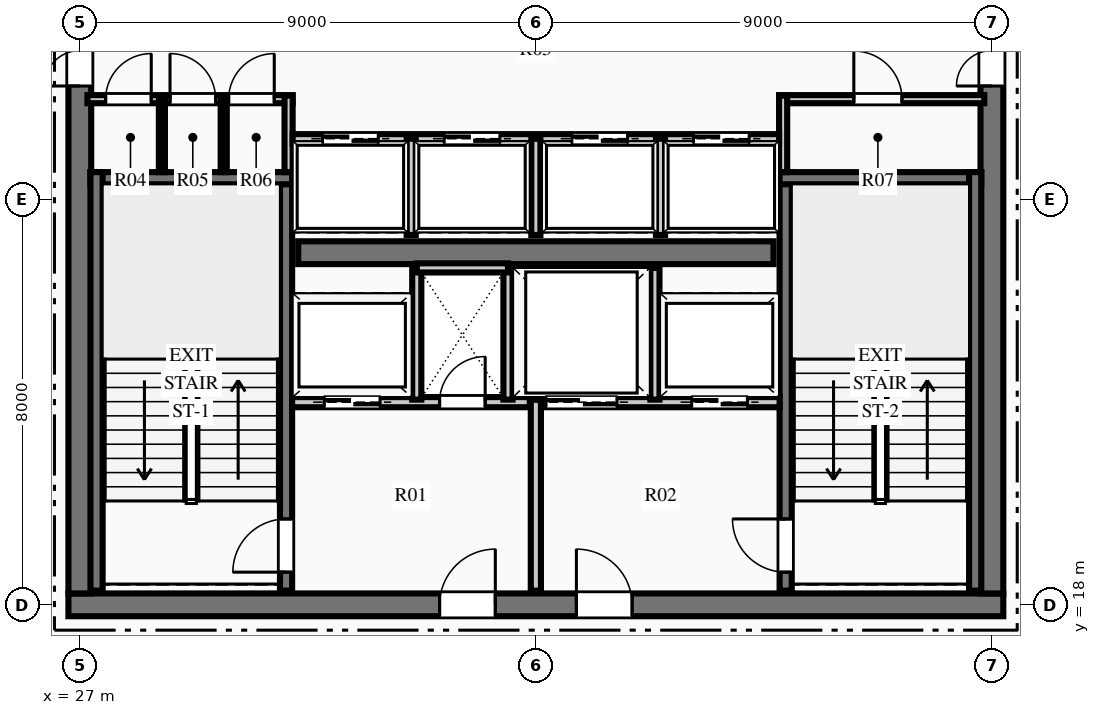
"""IFC4 building model, lengths in metres.
Left out: names, types, materials, properties, quantities, classifications, styles, units other than length and angle.
Written with IfcOpenShell. Run it as: python <this file> out.ifc"""

import sys

from ifc_helpers import new_model, si_unit, direction, frame, frame_2d, origin, place, context, subcontext, project, spatial, rectangle, extrude, element, fill, save


model = new_model("IFC4")
c1 = context("Model", 3, precision=1e-05, world=origin(), true_north=direction((0.0, 1.0)))
c2 = subcontext(c1, "Body", "Model", "MODEL_VIEW")
j1 = project(units=[si_unit("LENGTHUNIT", "METRE"), si_unit("PLANEANGLEUNIT", "RADIAN")], contexts=[c1])
p1 = place(None, origin())
s1 = spatial("IfcSite", under=j1, at=p1, CompositionType="ELEMENT")
p2 = place(p1, origin())
s2 = spatial("IfcBuilding", under=s1, at=p2, CompositionType="ELEMENT")
p3 = place(p2, frame((0.0, 0.0, 325.2)))
s3 = spatial("IfcBuildingStorey", under=s2, at=p3, CompositionType="ELEMENT", Elevation=325.2)
p4 = place(p3, frame((26.775, 18.0, 0.0), z_axis=(0.0, 0.0, 1.0), x_axis=(1.0, 0.0, 0.0)))
e1 = element("IfcWall", 1, at=p4, inside=s3, PredefinedType="SHEAR", context=c2, shape_type="SweptSolid", body=[
    extrude(rectangle(XDim=18.45, YDim=0.45, at=frame_2d((9.225, 0.0))), origin(), (0.0, 0.0, 1.0), 3.75),
])
p5 = place(p4, frame((7.325, 0.0, 0.0)))
e2 = element("IfcOpeningElement", 2, at=p5, cuts=e1, PredefinedType="OPENING", context=c2, shape_type="SweptSolid", body=[
    extrude(rectangle(XDim=1.1, YDim=2.15, at=frame_2d((0.55, 1.075))), frame((0.0, 0.235, 0.0), z_axis=(0.0, -1.0, 0.0), x_axis=(1.0, 0.0, 0.0)), (0.0, 0.0, 1.0), 0.47),
])
p6 = place(p4, frame((10.025, 0.0, 0.0)))
e3 = element("IfcOpeningElement", 3, at=p6, cuts=e1, PredefinedType="OPENING", context=c2, shape_type="SweptSolid", body=[
    extrude(rectangle(XDim=1.1, YDim=2.15, at=frame_2d((0.55, 1.075))), frame((0.0, 0.235, 0.0), z_axis=(0.0, -1.0, 0.0), x_axis=(1.0, 0.0, 0.0)), (0.0, 0.0, 1.0), 0.47),
])
p7 = place(p3, frame((27.0, 18.225, 0.0), z_axis=(0.0, 0.0, 1.0), x_axis=(0.0, 1.0, 0.0)))
e4 = element("IfcWall", 4, at=p7, inside=s3, PredefinedType="SHEAR", context=c2, shape_type="SweptSolid", body=[
    extrude(rectangle(XDim=15.55, YDim=0.45, at=frame_2d((7.775, 0.0))), origin(), (0.0, 0.0, 1.0), 3.75),
])
p8 = place(p7, frame((10.015, 0.0, 0.0)))
e5 = element("IfcOpeningElement", 5, at=p8, cuts=e4, PredefinedType="OPENING", context=c2, shape_type="SweptSolid", body=[
    extrude(rectangle(XDim=1.4, YDim=2.2, at=frame_2d((0.7, 1.1))), frame((0.0, 0.235, 0.0), z_axis=(0.0, -1.0, 0.0), x_axis=(1.0, 0.0, 0.0)), (0.0, 0.0, 1.0), 0.47),
])
p9 = place(p3, frame((45.0, 18.225, 0.0), z_axis=(0.0, 0.0, 1.0), x_axis=(0.0, 1.0, 0.0)))
e6 = element("IfcWall", 6, at=p9, inside=s3, PredefinedType="SHEAR", context=c2, shape_type="SweptSolid", body=[
    extrude(rectangle(XDim=15.55, YDim=0.45, at=frame_2d((7.775, 0.0))), origin(), (0.0, 0.0, 1.0), 3.75),
])
p10 = place(p9, frame((10.015, 0.0, 0.0)))
e7 = element("IfcOpeningElement", 7, at=p10, cuts=e6, PredefinedType="OPENING", context=c2, shape_type="SweptSolid", body=[
    extrude(rectangle(XDim=1.4, YDim=2.2, at=frame_2d((0.7, 1.1))), frame((0.0, 0.235, 0.0), z_axis=(0.0, -1.0, 0.0), x_axis=(1.0, 0.0, 0.0)), (0.0, 0.0, 1.0), 0.47),
])
p11 = place(p3, frame((31.31, 24.95, 0.0), z_axis=(0.0, 0.0, 1.0), x_axis=(1.0, 0.0, 0.0)))
e8 = element("IfcWall", 8, at=p11, inside=s3, PredefinedType="SHEAR", context=c2, shape_type="SweptSolid", body=[
    extrude(rectangle(XDim=9.38, YDim=0.45, at=frame_2d((4.69, 0.0))), origin(), (0.0, 0.0, 1.0), 3.75),
])
p12 = place(p3, frame((31.07, 18.28, 0.0), z_axis=(0.0, 0.0, 1.0), x_axis=(0.0, 1.0, 0.0)))
e9 = element("IfcWall", 9, at=p12, inside=s3, PredefinedType="SHEAR", context=c2, shape_type="SweptSolid", body=[
    extrude(rectangle(XDim=8.26, YDim=0.24, at=frame_2d((4.13, 0.0))), origin(), (0.0, 0.0, 1.0), 3.75),
])
p13 = place(p12, frame((0.365, 0.0, 0.0)))
e10 = element("IfcOpeningElement", 10, at=p13, cuts=e9, PredefinedType="OPENING", context=c2, shape_type="SweptSolid", body=[
    extrude(rectangle(XDim=1.05, YDim=2.15, at=frame_2d((0.525, 1.075))), frame((0.0, 0.13, 0.0), z_axis=(0.0, -1.0, 0.0), x_axis=(1.0, 0.0, 0.0)), (0.0, 0.0, 1.0), 0.26),
])
p14 = place(p3, frame((27.21, 26.42, 0.0), z_axis=(0.0, 0.0, 1.0), x_axis=(1.0, 0.0, 0.0)))
e11 = element("IfcWall", 11, at=p14, inside=s3, PredefinedType="SHEAR", context=c2, shape_type="SweptSolid", body=[
    extrude(rectangle(XDim=3.98, YDim=0.24, at=frame_2d((1.99, 0.0))), origin(), (0.0, 0.0, 1.0), 3.75),
])
p15 = place(p3, frame((27.33, 18.28, 0.0), z_axis=(0.0, 0.0, 1.0), x_axis=(0.0, 1.0, 0.0)))
e12 = element("IfcWall", 12, at=p15, inside=s3, PredefinedType="SHEAR", context=c2, shape_type="SweptSolid", body=[
    extrude(rectangle(XDim=8.26, YDim=0.24, at=frame_2d((4.13, 0.0))), origin(), (0.0, 0.0, 1.0), 3.75),
])
p16 = place(p3, frame((40.93, 18.28, 0.0), z_axis=(0.0, 0.0, 1.0), x_axis=(0.0, 1.0, 0.0)))
e13 = element("IfcWall", 13, at=p16, inside=s3, PredefinedType="SHEAR", context=c2, shape_type="SweptSolid", body=[
    extrude(rectangle(XDim=8.26, YDim=0.24, at=frame_2d((4.13, 0.0))), origin(), (0.0, 0.0, 1.0), 3.75),
])
p17 = place(p16, frame((0.365, 0.0, 0.0)))
e14 = element("IfcOpeningElement", 14, at=p17, cuts=e13, PredefinedType="OPENING", context=c2, shape_type="SweptSolid", body=[
    extrude(rectangle(XDim=1.05, YDim=2.15, at=frame_2d((0.525, 1.075))), frame((0.0, 0.13, 0.0), z_axis=(0.0, -1.0, 0.0), x_axis=(1.0, 0.0, 0.0)), (0.0, 0.0, 1.0), 0.26),
])
p18 = place(p3, frame((40.81, 26.42, 0.0), z_axis=(0.0, 0.0, 1.0), x_axis=(1.0, 0.0, 0.0)))
e15 = element("IfcWall", 15, at=p18, inside=s3, PredefinedType="SHEAR", context=c2, shape_type="SweptSolid", body=[
    extrude(rectangle(XDim=3.98, YDim=0.24, at=frame_2d((1.99, 0.0))), origin(), (0.0, 0.0, 1.0), 3.75),
])
p19 = place(p3, frame((44.67, 18.28, 0.0), z_axis=(0.0, 0.0, 1.0), x_axis=(0.0, 1.0, 0.0)))
e16 = element("IfcWall", 16, at=p19, inside=s3, PredefinedType="SHEAR", context=c2, shape_type="SweptSolid", body=[
    extrude(rectangle(XDim=8.26, YDim=0.24, at=frame_2d((4.13, 0.0))), origin(), (0.0, 0.0, 1.0), 3.75),
])
p20 = place(p3, frame((36.0, 18.28, 0.0), z_axis=(0.0, 0.0, 1.0), x_axis=(0.0, 1.0, 0.0)))
e17 = element("IfcWall", 17, at=p20, inside=s3, PredefinedType="PARTITIONING", context=c2, shape_type="SweptSolid", body=[
    extrude(rectangle(XDim=3.77, YDim=0.2, at=frame_2d((1.885, 0.0))), origin(), (0.0, 0.0, 1.0), 3.49),
])
p21 = place(p3, frame((31.19, 22.0, 0.0), z_axis=(0.0, 0.0, 1.0), x_axis=(1.0, 0.0, 0.0)))
e18 = element("IfcWall", 18, at=p21, inside=s3, PredefinedType="PARTITIONING", context=c2, shape_type="SweptSolid", body=[
    extrude(rectangle(XDim=4.69, YDim=0.2, at=frame_2d((2.345, 0.0))), origin(), (0.0, 0.0, 1.0), 3.49),
])
p22 = place(p21, frame((2.91, 0.0, 0.0)))
e19 = element("IfcOpeningElement", 19, at=p22, cuts=e18, PredefinedType="OPENING", context=c2, shape_type="SweptSolid", body=[
    extrude(rectangle(XDim=0.9, YDim=2.15, at=frame_2d((0.45, 1.075))), frame((0.0, 0.11, 0.0), z_axis=(0.0, -1.0, 0.0), x_axis=(1.0, 0.0, 0.0)), (0.0, 0.0, 1.0), 0.22),
])
p23 = place(p21, frame((0.635, 0.0, 0.0)))
e20 = element("IfcOpeningElement", 20, at=p23, cuts=e18, PredefinedType="OPENING", context=c2, shape_type="SweptSolid", body=[
    extrude(rectangle(XDim=1.1, YDim=2.15, at=frame_2d((0.55, 1.075))), frame((0.0, 0.11, 0.0), z_axis=(0.0, -1.0, 0.0), x_axis=(1.0, 0.0, 0.0)), (0.0, 0.0, 1.0), 0.22),
])
p24 = place(p3, frame((36.12, 22.0, 0.0), z_axis=(0.0, 0.0, 1.0), x_axis=(1.0, 0.0, 0.0)))
e21 = element("IfcWall", 21, at=p24, inside=s3, PredefinedType="PARTITIONING", context=c2, shape_type="SweptSolid", body=[
    extrude(rectangle(XDim=4.69, YDim=0.2, at=frame_2d((2.345, 0.0))), origin(), (0.0, 0.0, 1.0), 3.49),
])
p25 = place(p24, frame((2.955, 0.0, 0.0)))
e22 = element("IfcOpeningElement", 22, at=p25, cuts=e21, PredefinedType="OPENING", context=c2, shape_type="SweptSolid", body=[
    extrude(rectangle(XDim=1.1, YDim=2.15, at=frame_2d((0.55, 1.075))), frame((0.0, 0.11, 0.0), z_axis=(0.0, -1.0, 0.0), x_axis=(1.0, 0.0, 0.0)), (0.0, 0.0, 1.0), 0.22),
])
p26 = place(p24, frame((0.08, 0.0, 0.0)))
e23 = element("IfcOpeningElement", 23, at=p26, cuts=e21, PredefinedType="OPENING", context=c2, shape_type="SweptSolid", body=[
    extrude(rectangle(XDim=1.4, YDim=2.2, at=frame_2d((0.7, 1.1))), frame((0.0, 0.11, 0.0), z_axis=(0.0, -1.0, 0.0), x_axis=(1.0, 0.0, 0.0)), (0.0, 0.0, 1.0), 0.22),
])
for number, where, z_axis, x_axis in (
    (24, (33.65, 22.05, 0.0), (0.0, 0.0, 1.0), (0.0, 1.0, 0.0)),
    (25, (35.45, 22.05, 0.0), (0.0, 0.0, 1.0), (0.0, 1.0, 0.0)),
):
    element("IfcWall", number, at=place(p3, frame(where, z_axis=z_axis, x_axis=x_axis)), inside=s3, PredefinedType="PARTITIONING", context=c2, shape_type="SweptSolid", body=[
        extrude(rectangle(XDim=2.6, YDim=0.18, at=frame_2d((1.3, 0.0))), origin(), (0.0, 0.0, 1.0), 3.49),
    ])
p27 = place(p3, frame((33.65, 24.65, 0.0), z_axis=(0.0, 0.0, 1.0), x_axis=(1.0, 0.0, 0.0)))
e26 = element("IfcWall", 26, at=p27, inside=s3, PredefinedType="PARTITIONING", context=c2, shape_type="SweptSolid", body=[
    extrude(rectangle(XDim=1.8, YDim=0.18, at=frame_2d((0.9, 0.0))), origin(), (0.0, 0.0, 1.0), 3.49),
])
p28 = place(p3, frame((38.35, 22.05, 0.0), z_axis=(0.0, 0.0, 1.0), x_axis=(0.0, 1.0, 0.0)))
e27 = element("IfcWall", 27, at=p28, inside=s3, PredefinedType="PARTITIONING", context=c2, shape_type="SweptSolid", body=[
    extrude(rectangle(XDim=2.6, YDim=0.18, at=frame_2d((1.3, 0.0))), origin(), (0.0, 0.0, 1.0), 3.49),
])
p29 = place(p3, frame((27.15, 27.98, 0.0), z_axis=(0.0, 0.0, 1.0), x_axis=(1.0, 0.0, 0.0)))
e28 = element("IfcWall", 28, at=p29, inside=s3, PredefinedType="PARTITIONING", context=c2, shape_type="SweptSolid", body=[
    extrude(rectangle(XDim=4.05, YDim=0.16, at=frame_2d((2.025, 0.0))), origin(), (0.0, 0.0, 1.0), 3.49),
])
p30 = place(p29, frame((0.36, 0.0, 0.0)))
e29 = element("IfcOpeningElement", 29, at=p30, cuts=e28, PredefinedType="OPENING", context=c2, shape_type="SweptSolid", body=[
    extrude(rectangle(XDim=0.9, YDim=2.15, at=frame_2d((0.45, 1.075))), frame((0.0, 0.09, 0.0), z_axis=(0.0, -1.0, 0.0), x_axis=(1.0, 0.0, 0.0)), (0.0, 0.0, 1.0), 0.18),
])
p31 = place(p29, frame((1.63, 0.0, 0.0)))
e30 = element("IfcOpeningElement", 30, at=p31, cuts=e28, PredefinedType="OPENING", context=c2, shape_type="SweptSolid", body=[
    extrude(rectangle(XDim=0.9, YDim=2.15, at=frame_2d((0.45, 1.075))), frame((0.0, 0.09, 0.0), z_axis=(0.0, -1.0, 0.0), x_axis=(1.0, 0.0, 0.0)), (0.0, 0.0, 1.0), 0.18),
])
p32 = place(p29, frame((2.788, 0.0, 0.0)))
e31 = element("IfcOpeningElement", 31, at=p32, cuts=e28, PredefinedType="OPENING", context=c2, shape_type="SweptSolid", body=[
    extrude(rectangle(XDim=0.9, YDim=2.15, at=frame_2d((0.45, 1.075))), frame((0.0, 0.09, 0.0), z_axis=(0.0, -1.0, 0.0), x_axis=(1.0, 0.0, 0.0)), (0.0, 0.0, 1.0), 0.18),
])
p33 = place(p3, frame((31.12, 26.54, 0.0), z_axis=(0.0, 0.0, 1.0), x_axis=(0.0, 1.0, 0.0)))
e32 = element("IfcWall", 32, at=p33, inside=s3, PredefinedType="PARTITIONING", context=c2, shape_type="SweptSolid", body=[
    extrude(rectangle(XDim=1.51, YDim=0.16, at=frame_2d((0.755, 0.0))), origin(), (0.0, 0.0, 1.0), 3.49),
])
p34 = place(p3, frame((40.8, 27.98, 0.0), z_axis=(0.0, 0.0, 1.0), x_axis=(1.0, 0.0, 0.0)))
e33 = element("IfcWall", 33, at=p34, inside=s3, PredefinedType="PARTITIONING", context=c2, shape_type="SweptSolid", body=[
    extrude(rectangle(XDim=4.05, YDim=0.16, at=frame_2d((2.025, 0.0))), origin(), (0.0, 0.0, 1.0), 3.49),
])
p35 = place(p34, frame((1.475, 0.0, 0.0)))
e34 = element("IfcOpeningElement", 34, at=p35, cuts=e33, PredefinedType="OPENING", context=c2, shape_type="SweptSolid", body=[
    extrude(rectangle(XDim=0.95, YDim=2.15, at=frame_2d((0.475, 1.075))), frame((0.0, 0.09, 0.0), z_axis=(0.0, -1.0, 0.0), x_axis=(1.0, 0.0, 0.0)), (0.0, 0.0, 1.0), 0.18),
])
p36 = place(p3, frame((40.88, 26.54, 0.0), z_axis=(0.0, 0.0, 1.0), x_axis=(0.0, 1.0, 0.0)))
e35 = element("IfcWall", 35, at=p36, inside=s3, PredefinedType="PARTITIONING", context=c2, shape_type="SweptSolid", body=[
    extrude(rectangle(XDim=1.51, YDim=0.16, at=frame_2d((0.755, 0.0))), origin(), (0.0, 0.0, 1.0), 3.49),
])
for number, where, z_axis, x_axis in (
    (36, (28.62, 26.54, 0.0), (0.0, 0.0, 1.0), (0.0, 1.0, 0.0)),
    (37, (29.84, 26.54, 0.0), (0.0, 0.0, 1.0), (0.0, 1.0, 0.0)),
):
    element("IfcWall", number, at=place(p3, frame(where, z_axis=z_axis, x_axis=x_axis)), inside=s3, PredefinedType="PARTITIONING", context=c2, shape_type="SweptSolid", body=[
        extrude(rectangle(XDim=1.44, YDim=0.12, at=frame_2d((0.72, 0.0))), origin(), (0.0, 0.0, 1.0), 3.49),
    ])
p37 = place(p3, frame((31.2, 27.2, 0.0), z_axis=(0.0, 0.0, 1.0), x_axis=(1.0, 0.0, 0.0)))
e38 = element("IfcWall", 38, at=p37, inside=s3, PredefinedType="PARTITIONING", context=c2, shape_type="SweptSolid", body=[
    extrude(rectangle(XDim=9.6, YDim=0.18, at=frame_2d((4.8, 0.0))), origin(), (0.0, 0.0, 1.0), 3.49),
])
p38 = place(p37, frame((0.59, 0.0, 0.0)))
e39 = element("IfcOpeningElement", 39, at=p38, cuts=e38, PredefinedType="OPENING", context=c2, shape_type="SweptSolid", body=[
    extrude(rectangle(XDim=1.1, YDim=2.15, at=frame_2d((0.55, 1.075))), frame((0.0, 0.1, 0.0), z_axis=(0.0, -1.0, 0.0), x_axis=(1.0, 0.0, 0.0)), (0.0, 0.0, 1.0), 0.2),
])
p39 = place(p37, frame((2.99, 0.0, 0.0)))
e40 = element("IfcOpeningElement", 40, at=p39, cuts=e38, PredefinedType="OPENING", context=c2, shape_type="SweptSolid", body=[
    extrude(rectangle(XDim=1.1, YDim=2.15, at=frame_2d((0.55, 1.075))), frame((0.0, 0.1, 0.0), z_axis=(0.0, -1.0, 0.0), x_axis=(1.0, 0.0, 0.0)), (0.0, 0.0, 1.0), 0.2),
])
p40 = place(p37, frame((5.51, 0.0, 0.0)))
e41 = element("IfcOpeningElement", 41, at=p40, cuts=e38, PredefinedType="OPENING", context=c2, shape_type="SweptSolid", body=[
    extrude(rectangle(XDim=1.1, YDim=2.15, at=frame_2d((0.55, 1.075))), frame((0.0, 0.1, 0.0), z_axis=(0.0, -1.0, 0.0), x_axis=(1.0, 0.0, 0.0)), (0.0, 0.0, 1.0), 0.2),
])
p41 = place(p37, frame((7.91, 0.0, 0.0)))
e42 = element("IfcOpeningElement", 42, at=p41, cuts=e38, PredefinedType="OPENING", context=c2, shape_type="SweptSolid", body=[
    extrude(rectangle(XDim=1.1, YDim=2.15, at=frame_2d((0.55, 1.075))), frame((0.0, 0.1, 0.0), z_axis=(0.0, -1.0, 0.0), x_axis=(1.0, 0.0, 0.0)), (0.0, 0.0, 1.0), 0.2),
])
for number, where, z_axis, x_axis in (
    (43, (33.54, 25.3, 0.0), (0.0, 0.0, 1.0), (0.0, 1.0, 0.0)),
    (44, (36.0, 25.3, 0.0), (0.0, 0.0, 1.0), (0.0, 1.0, 0.0)),
    (45, (38.46, 25.3, 0.0), (0.0, 0.0, 1.0), (0.0, 1.0, 0.0)),
):
    element("IfcWall", number, at=place(p3, frame(where, z_axis=z_axis, x_axis=x_axis)), inside=s3, PredefinedType="PARTITIONING", context=c2, shape_type="SweptSolid", body=[
        extrude(rectangle(XDim=1.9, YDim=0.18, at=frame_2d((0.95, 0.0))), origin(), (0.0, 0.0, 1.0), 3.49),
    ])
p42 = place(p30, origin())
e46 = element("IfcDoor", 46, at=p42, inside=s3, OperationType="SINGLE_SWING_RIGHT", PredefinedType="DOOR", context=c2, shape_type="SweptSolid", body=[
    extrude(rectangle(XDim=0.9, YDim=2.15, at=frame_2d((0.45, 1.075))), frame((0.0, 0.025, 0.0), z_axis=(0.0, -1.0, 0.0), x_axis=(1.0, 0.0, 0.0)), (0.0, 0.0, 1.0), 0.05),
])
fill(e29, e46)
p43 = place(p31, origin())
e47 = element("IfcDoor", 47, at=p43, inside=s3, OperationType="SINGLE_SWING_LEFT", PredefinedType="DOOR", context=c2, shape_type="SweptSolid", body=[
    extrude(rectangle(XDim=0.9, YDim=2.15, at=frame_2d((0.45, 1.075))), frame((0.0, 0.025, 0.0), z_axis=(0.0, -1.0, 0.0), x_axis=(1.0, 0.0, 0.0)), (0.0, 0.0, 1.0), 0.05),
])
fill(e30, e47)
p44 = place(p32, origin())
e48 = element("IfcDoor", 48, at=p44, inside=s3, OperationType="SINGLE_SWING_RIGHT", PredefinedType="DOOR", context=c2, shape_type="SweptSolid", body=[
    extrude(rectangle(XDim=0.9, YDim=2.15, at=frame_2d((0.45, 1.075))), frame((0.0, 0.025, 0.0), z_axis=(0.0, -1.0, 0.0), x_axis=(1.0, 0.0, 0.0)), (0.0, 0.0, 1.0), 0.05),
])
fill(e31, e48)
p45 = place(p35, origin())
e49 = element("IfcDoor", 49, at=p45, inside=s3, OperationType="SINGLE_SWING_LEFT", PredefinedType="DOOR", context=c2, shape_type="SweptSolid", body=[
    extrude(rectangle(XDim=0.95, YDim=2.15, at=frame_2d((0.475, 1.075))), frame((0.0, 0.025, 0.0), z_axis=(0.0, -1.0, 0.0), x_axis=(1.0, 0.0, 0.0)), (0.0, 0.0, 1.0), 0.05),
])
fill(e34, e49)
p46 = place(p13, origin())
e50 = element("IfcDoor", 50, at=p46, inside=s3, OperationType="SINGLE_SWING_LEFT", PredefinedType="DOOR", context=c2, shape_type="SweptSolid", body=[
    extrude(rectangle(XDim=1.05, YDim=2.15, at=frame_2d((0.525, 1.075))), frame((0.0, 0.025, 0.0), z_axis=(0.0, -1.0, 0.0), x_axis=(1.0, 0.0, 0.0)), (0.0, 0.0, 1.0), 0.05),
])
fill(e10, e50)
p47 = place(p17, origin())
e51 = element("IfcDoor", 51, at=p47, inside=s3, OperationType="SINGLE_SWING_RIGHT", PredefinedType="DOOR", context=c2, shape_type="SweptSolid", body=[
    extrude(rectangle(XDim=1.05, YDim=2.15, at=frame_2d((0.525, 1.075))), frame((0.0, 0.025, 0.0), z_axis=(0.0, -1.0, 0.0), x_axis=(1.0, 0.0, 0.0)), (0.0, 0.0, 1.0), 0.05),
])
fill(e14, e51)
p48 = place(p5, origin())
e52 = element("IfcDoor", 52, at=p48, inside=s3, OperationType="SINGLE_SWING_RIGHT", PredefinedType="DOOR", context=c2, shape_type="SweptSolid", body=[
    extrude(rectangle(XDim=1.1, YDim=2.15, at=frame_2d((0.55, 1.075))), frame((0.0, 0.025, 0.0), z_axis=(0.0, -1.0, 0.0), x_axis=(1.0, 0.0, 0.0)), (0.0, 0.0, 1.0), 0.05),
])
fill(e2, e52)
p49 = place(p6, origin())
e53 = element("IfcDoor", 53, at=p49, inside=s3, OperationType="SINGLE_SWING_LEFT", PredefinedType="DOOR", context=c2, shape_type="SweptSolid", body=[
    extrude(rectangle(XDim=1.1, YDim=2.15, at=frame_2d((0.55, 1.075))), frame((0.0, 0.025, 0.0), z_axis=(0.0, -1.0, 0.0), x_axis=(1.0, 0.0, 0.0)), (0.0, 0.0, 1.0), 0.05),
])
fill(e3, e53)
p50 = place(p22, origin())
e54 = element("IfcDoor", 54, at=p50, inside=s3, OperationType="SINGLE_SWING_RIGHT", PredefinedType="DOOR", context=c2, shape_type="SweptSolid", body=[
    extrude(rectangle(XDim=0.9, YDim=2.15, at=frame_2d((0.45, 1.075))), frame((0.0, 0.025, 0.0), z_axis=(0.0, -1.0, 0.0), x_axis=(1.0, 0.0, 0.0)), (0.0, 0.0, 1.0), 0.05),
])
fill(e19, e54)
p51 = place(p8, origin())
e55 = element("IfcDoor", 55, at=p51, inside=s3, OperationType="DOUBLE_DOOR_SINGLE_SWING", PredefinedType="DOOR", context=c2, shape_type="SweptSolid", body=[
    extrude(rectangle(XDim=1.4, YDim=2.2, at=frame_2d((0.7, 1.1))), frame((0.0, 0.025, 0.0), z_axis=(0.0, -1.0, 0.0), x_axis=(1.0, 0.0, 0.0)), (0.0, 0.0, 1.0), 0.05),
])
fill(e5, e55)
p52 = place(p10, origin())
e56 = element("IfcDoor", 56, at=p52, inside=s3, OperationType="DOUBLE_DOOR_SINGLE_SWING", PredefinedType="DOOR", context=c2, shape_type="SweptSolid", body=[
    extrude(rectangle(XDim=1.4, YDim=2.2, at=frame_2d((0.7, 1.1))), frame((0.0, 0.025, 0.0), z_axis=(0.0, -1.0, 0.0), x_axis=(1.0, 0.0, 0.0)), (0.0, 0.0, 1.0), 0.05),
])
fill(e7, e56)
p53 = place(p38, origin())
e57 = element("IfcDoor", 57, at=p53, inside=s3, OperationType="SLIDING_TO_LEFT", PredefinedType="DOOR", context=c2, shape_type="SweptSolid", body=[
    extrude(rectangle(XDim=1.1, YDim=2.15, at=frame_2d((0.55, 1.075))), frame((0.0, 0.025, 0.0), z_axis=(0.0, -1.0, 0.0), x_axis=(1.0, 0.0, 0.0)), (0.0, 0.0, 1.0), 0.05),
])
fill(e39, e57)
p54 = place(p39, origin())
e58 = element("IfcDoor", 58, at=p54, inside=s3, OperationType="SLIDING_TO_LEFT", PredefinedType="DOOR", context=c2, shape_type="SweptSolid", body=[
    extrude(rectangle(XDim=1.1, YDim=2.15, at=frame_2d((0.55, 1.075))), frame((0.0, 0.025, 0.0), z_axis=(0.0, -1.0, 0.0), x_axis=(1.0, 0.0, 0.0)), (0.0, 0.0, 1.0), 0.05),
])
fill(e40, e58)
p55 = place(p40, origin())
e59 = element("IfcDoor", 59, at=p55, inside=s3, OperationType="SLIDING_TO_LEFT", PredefinedType="DOOR", context=c2, shape_type="SweptSolid", body=[
    extrude(rectangle(XDim=1.1, YDim=2.15, at=frame_2d((0.55, 1.075))), frame((0.0, 0.025, 0.0), z_axis=(0.0, -1.0, 0.0), x_axis=(1.0, 0.0, 0.0)), (0.0, 0.0, 1.0), 0.05),
])
fill(e41, e59)
p56 = place(p41, origin())
e60 = element("IfcDoor", 60, at=p56, inside=s3, OperationType="SLIDING_TO_LEFT", PredefinedType="DOOR", context=c2, shape_type="SweptSolid", body=[
    extrude(rectangle(XDim=1.1, YDim=2.15, at=frame_2d((0.55, 1.075))), frame((0.0, 0.025, 0.0), z_axis=(0.0, -1.0, 0.0), x_axis=(1.0, 0.0, 0.0)), (0.0, 0.0, 1.0), 0.05),
])
fill(e42, e60)
p57 = place(p23, origin())
e61 = element("IfcDoor", 61, at=p57, inside=s3, OperationType="SLIDING_TO_LEFT", PredefinedType="DOOR", context=c2, shape_type="SweptSolid", body=[
    extrude(rectangle(XDim=1.1, YDim=2.15, at=frame_2d((0.55, 1.075))), frame((0.0, 0.025, 0.0), z_axis=(0.0, -1.0, 0.0), x_axis=(1.0, 0.0, 0.0)), (0.0, 0.0, 1.0), 0.05),
])
fill(e20, e61)
p58 = place(p25, origin())
e62 = element("IfcDoor", 62, at=p58, inside=s3, OperationType="SLIDING_TO_LEFT", PredefinedType="DOOR", context=c2, shape_type="SweptSolid", body=[
    extrude(rectangle(XDim=1.1, YDim=2.15, at=frame_2d((0.55, 1.075))), frame((0.0, 0.025, 0.0), z_axis=(0.0, -1.0, 0.0), x_axis=(1.0, 0.0, 0.0)), (0.0, 0.0, 1.0), 0.05),
])
fill(e22, e62)
p59 = place(p26, origin())
e63 = element("IfcDoor", 63, at=p59, inside=s3, OperationType="SLIDING_TO_LEFT", PredefinedType="DOOR", context=c2, shape_type="SweptSolid", body=[
    extrude(rectangle(XDim=1.4, YDim=2.2, at=frame_2d((0.7, 1.1))), frame((0.0, 0.025, 0.0), z_axis=(0.0, -1.0, 0.0), x_axis=(1.0, 0.0, 0.0)), (0.0, 0.0, 1.0), 0.05),
])
fill(e23, e63)
save(model, sys.argv[1])
